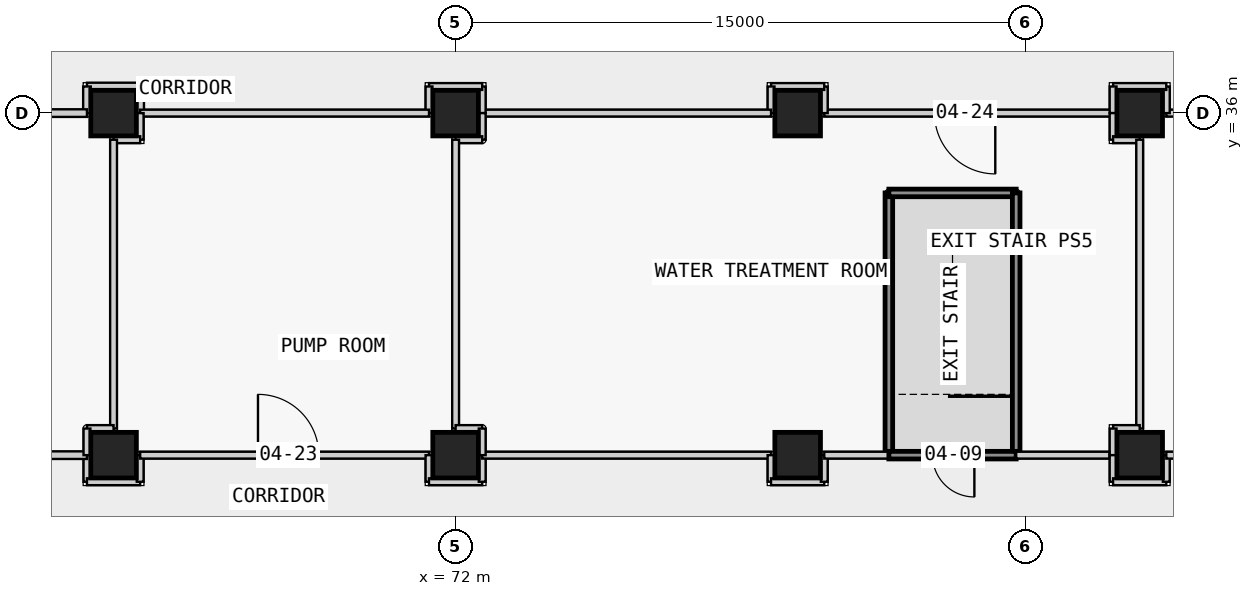
"""IFC4 building model, lengths in metres.
Left out: names, types, materials, properties, quantities, classifications, styles, units other than length and angle.
Written with IfcOpenShell. Run it as: python <this file> out.ifc"""

import sys

from ifc_helpers import new_model, si_unit, direction, frame, frame_2d, origin, origin_2d, place, context, subcontext, project, spatial, rectangle, extrude, element, fill, save


model = new_model("IFC4")
c1 = context("Model", 3, precision=1e-05, world=origin(), true_north=direction((0.0, 1.0)))
c2 = subcontext(c1, "Body", "Model", "MODEL_VIEW")
j1 = project(units=[si_unit("LENGTHUNIT", "METRE"), si_unit("PLANEANGLEUNIT", "RADIAN")], contexts=[c1])
p1 = place(None, origin())
s1 = spatial("IfcSite", under=j1, at=p1, CompositionType="ELEMENT")
p2 = place(p1, origin())
s2 = spatial("IfcBuilding", under=s1, at=p2, CompositionType="ELEMENT")
p3 = place(p2, frame((0.0, 0.0, 21.8)))
s3 = spatial("IfcBuildingStorey", under=s2, at=p3, CompositionType="ELEMENT", Elevation=21.8)
for number, where, z_axis, x_axis in (
    (1, (63.0, 27.0, 0.0), (0.0, 0.0, 1.0), (1.0, 0.0, 0.0)),
    (2, (63.0, 36.0, 0.0), (0.0, 0.0, 1.0), (1.0, 0.0, 0.0)),
    (3, (72.0, 27.0, 0.0), (0.0, 0.0, 1.0), (1.0, 0.0, 0.0)),
    (4, (72.0, 36.0, 0.0), (0.0, 0.0, 1.0), (1.0, 0.0, 0.0)),
    (5, (81.0, 27.0, 0.0), (0.0, 0.0, 1.0), (1.0, 0.0, 0.0)),
    (6, (81.0, 36.0, 0.0), (0.0, 0.0, 1.0), (1.0, 0.0, 0.0)),
    (7, (90.0, 27.0, 0.0), (0.0, 0.0, 1.0), (1.0, 0.0, 0.0)),
    (8, (90.0, 36.0, 0.0), (0.0, 0.0, 1.0), (1.0, 0.0, 0.0)),
):
    element("IfcColumn", number, at=place(p3, frame(where, z_axis=z_axis, x_axis=x_axis)), inside=s3, PredefinedType="COLUMN", context=c2, shape_type="SweptSolid", body=[
        extrude(rectangle(XDim=1.2, YDim=1.2, at=origin_2d()), origin(), (0.0, 0.0, 1.0), 5.0),
    ])
p4 = place(p3, frame((89.3, 36.0, 0.0), z_axis=(0.0, 0.0, 1.0), x_axis=(-1.0, 0.0, 0.0)))
e9 = element("IfcWall", 9, at=p4, inside=s3, PredefinedType="PARTITIONING", context=c2, shape_type="SweptSolid", body=[
    extrude(rectangle(XDim=7.6, YDim=0.18, at=frame_2d((3.8, 0.0))), origin(), (0.0, 0.0, 1.0), 4.5),
])
p5 = place(p4, frame((3.1, 0.0, 0.0)))
e10 = element("IfcOpeningElement", 10, at=p5, cuts=e9, PredefinedType="OPENING", context=c2, shape_type="SweptSolid", body=[
    extrude(rectangle(XDim=1.6, YDim=2.4, at=frame_2d((0.8, 1.2))), frame((0.0, 0.1, 0.0), z_axis=(0.0, -1.0, 0.0), x_axis=(1.0, 0.0, 0.0)), (0.0, 0.0, 1.0), 0.2),
])
p6 = place(p3, frame((81.7, 36.0, 0.0), z_axis=(0.0, 0.0, 1.0), x_axis=(0.0, 1.0, 0.0)))
e11 = element("IfcWall", 11, at=p6, inside=s3, PredefinedType="PARTITIONING", context=c2, shape_type="SweptSolid", body=[
    extrude(rectangle(XDim=0.7, YDim=0.18, at=frame_2d((0.35, 0.0))), origin(), (0.0, 0.0, 1.0), 4.5),
])
p7 = place(p3, frame((81.7, 36.7, 0.0), z_axis=(0.0, 0.0, 1.0), x_axis=(-1.0, 0.0, 0.0)))
e12 = element("IfcWall", 12, at=p7, inside=s3, PredefinedType="PARTITIONING", context=c2, shape_type="SweptSolid", body=[
    extrude(rectangle(XDim=1.4, YDim=0.18, at=frame_2d((0.7, 0.0))), origin(), (0.0, 0.0, 1.0), 4.5),
])
p8 = place(p3, frame((80.3, 36.7, 0.0), z_axis=(0.0, 0.0, 1.0), x_axis=(0.0, -1.0, 0.0)))
e13 = element("IfcWall", 13, at=p8, inside=s3, PredefinedType="PARTITIONING", context=c2, shape_type="SweptSolid", body=[
    extrude(rectangle(XDim=0.7, YDim=0.18, at=frame_2d((0.35, 0.0))), origin(), (0.0, 0.0, 1.0), 4.5),
])
p9 = place(p3, frame((80.3, 36.0, 0.0), z_axis=(0.0, 0.0, 1.0), x_axis=(-1.0, 0.0, 0.0)))
e14 = element("IfcWall", 14, at=p9, inside=s3, PredefinedType="PARTITIONING", context=c2, shape_type="SweptSolid", body=[
    extrude(rectangle(XDim=7.6, YDim=0.18, at=frame_2d((3.8, 0.0))), origin(), (0.0, 0.0, 1.0), 4.5),
])
p10 = place(p3, frame((83.4, 27.0, 0.0), z_axis=(0.0, 0.0, 1.0), x_axis=(0.0, 1.0, 0.0)))
e15 = element("IfcWall", 15, at=p10, inside=s3, PredefinedType="PARTITIONING", context=c2, shape_type="SweptSolid", body=[
    extrude(rectangle(XDim=6.9, YDim=0.2, at=frame_2d((3.45, 0.0))), origin(), (0.0, 0.0, 1.0), 4.5),
])
p11 = place(p3, frame((83.4, 33.9, 0.0), z_axis=(0.0, 0.0, 1.0), x_axis=(1.0, 0.0, 0.0)))
e16 = element("IfcWall", 16, at=p11, inside=s3, PredefinedType="PARTITIONING", context=c2, shape_type="SweptSolid", body=[
    extrude(rectangle(XDim=3.35, YDim=0.2, at=frame_2d((1.675, 0.0))), origin(), (0.0, 0.0, 1.0), 4.5),
])
p12 = place(p3, frame((86.75, 33.9, 0.0), z_axis=(0.0, 0.0, 1.0), x_axis=(0.0, -1.0, 0.0)))
e17 = element("IfcWall", 17, at=p12, inside=s3, PredefinedType="PARTITIONING", context=c2, shape_type="SweptSolid", body=[
    extrude(rectangle(XDim=6.9, YDim=0.2, at=frame_2d((3.45, 0.0))), origin(), (0.0, 0.0, 1.0), 4.5),
])
p13 = place(p3, frame((63.7, 36.0, 0.0), z_axis=(0.0, 0.0, 1.0), x_axis=(0.0, 1.0, 0.0)))
e18 = element("IfcWall", 18, at=p13, inside=s3, PredefinedType="PARTITIONING", context=c2, shape_type="SweptSolid", body=[
    extrude(rectangle(XDim=0.7, YDim=0.2, at=frame_2d((0.35, 0.0))), origin(), (0.0, 0.0, 1.0), 4.5),
])
p14 = place(p3, frame((63.7, 36.7, 0.0), z_axis=(0.0, 0.0, 1.0), x_axis=(-1.0, 0.0, 0.0)))
e19 = element("IfcWall", 19, at=p14, inside=s3, PredefinedType="PARTITIONING", context=c2, shape_type="SweptSolid", body=[
    extrude(rectangle(XDim=1.4, YDim=0.2, at=frame_2d((0.7, 0.0))), origin(), (0.0, 0.0, 1.0), 4.5),
])
p15 = place(p3, frame((62.3, 36.7, 0.0), z_axis=(0.0, 0.0, 1.0), x_axis=(0.0, -1.0, 0.0)))
e20 = element("IfcWall", 20, at=p15, inside=s3, PredefinedType="PARTITIONING", context=c2, shape_type="SweptSolid", body=[
    extrude(rectangle(XDim=0.7, YDim=0.2, at=frame_2d((0.35, 0.0))), origin(), (0.0, 0.0, 1.0), 4.5),
])
p16 = place(p3, frame((62.3, 36.0, 0.0), z_axis=(0.0, 0.0, 1.0), x_axis=(-1.0, 0.0, 0.0)))
e21 = element("IfcWall", 21, at=p16, inside=s3, PredefinedType="PARTITIONING", context=c2, shape_type="SweptSolid", body=[
    extrude(rectangle(XDim=7.6, YDim=0.2, at=frame_2d((3.8, 0.0))), origin(), (0.0, 0.0, 1.0), 4.5),
])
p17 = place(p16, frame((3.35, 0.0, 0.0)))
e22 = element("IfcOpeningElement", 22, at=p17, cuts=e21, PredefinedType="OPENING", context=c2, shape_type="SweptSolid", body=[
    extrude(rectangle(XDim=0.9, YDim=2.1, at=frame_2d((0.45, 1.05))), frame((0.0, 0.11, 0.0), z_axis=(0.0, -1.0, 0.0), x_axis=(1.0, 0.0, 0.0)), (0.0, 0.0, 1.0), 0.22),
])
p18 = place(p3, frame((62.3, 27.0, 0.0), z_axis=(0.0, 0.0, 1.0), x_axis=(0.0, -1.0, 0.0)))
e23 = element("IfcWall", 23, at=p18, inside=s3, PredefinedType="PARTITIONING", context=c2, shape_type="SweptSolid", body=[
    extrude(rectangle(XDim=0.7, YDim=0.18, at=frame_2d((0.35, 0.0))), origin(), (0.0, 0.0, 1.0), 4.5),
])
p19 = place(p3, frame((62.3, 26.3, 0.0), z_axis=(0.0, 0.0, 1.0), x_axis=(1.0, 0.0, 0.0)))
e24 = element("IfcWall", 24, at=p19, inside=s3, PredefinedType="PARTITIONING", context=c2, shape_type="SweptSolid", body=[
    extrude(rectangle(XDim=1.4, YDim=0.18, at=frame_2d((0.7, 0.0))), origin(), (0.0, 0.0, 1.0), 4.5),
])
p20 = place(p3, frame((63.7, 26.3, 0.0), z_axis=(0.0, 0.0, 1.0), x_axis=(0.0, 1.0, 0.0)))
e25 = element("IfcWall", 25, at=p20, inside=s3, PredefinedType="PARTITIONING", context=c2, shape_type="SweptSolid", body=[
    extrude(rectangle(XDim=0.7, YDim=0.18, at=frame_2d((0.35, 0.0))), origin(), (0.0, 0.0, 1.0), 4.5),
])
p21 = place(p3, frame((63.7, 27.0, 0.0), z_axis=(0.0, 0.0, 1.0), x_axis=(1.0, 0.0, 0.0)))
e26 = element("IfcWall", 26, at=p21, inside=s3, PredefinedType="PARTITIONING", context=c2, shape_type="SweptSolid", body=[
    extrude(rectangle(XDim=7.6, YDim=0.18, at=frame_2d((3.8, 0.0))), origin(), (0.0, 0.0, 1.0), 4.5),
])
p22 = place(p21, frame((3.1, 0.0, 0.0)))
e27 = element("IfcOpeningElement", 27, at=p22, cuts=e26, PredefinedType="OPENING", context=c2, shape_type="SweptSolid", body=[
    extrude(rectangle(XDim=1.6, YDim=2.4, at=frame_2d((0.8, 1.2))), frame((0.0, 0.1, 0.0), z_axis=(0.0, -1.0, 0.0), x_axis=(1.0, 0.0, 0.0)), (0.0, 0.0, 1.0), 0.2),
])
p23 = place(p3, frame((71.3, 27.0, 0.0), z_axis=(0.0, 0.0, 1.0), x_axis=(0.0, -1.0, 0.0)))
e28 = element("IfcWall", 28, at=p23, inside=s3, PredefinedType="PARTITIONING", context=c2, shape_type="SweptSolid", body=[
    extrude(rectangle(XDim=0.7, YDim=0.18, at=frame_2d((0.35, 0.0))), origin(), (0.0, 0.0, 1.0), 4.5),
])
p24 = place(p3, frame((71.3, 26.3, 0.0), z_axis=(0.0, 0.0, 1.0), x_axis=(1.0, 0.0, 0.0)))
e29 = element("IfcWall", 29, at=p24, inside=s3, PredefinedType="PARTITIONING", context=c2, shape_type="SweptSolid", body=[
    extrude(rectangle(XDim=1.4, YDim=0.18, at=frame_2d((0.7, 0.0))), origin(), (0.0, 0.0, 1.0), 4.5),
])
p25 = place(p3, frame((72.7, 26.3, 0.0), z_axis=(0.0, 0.0, 1.0), x_axis=(0.0, 1.0, 0.0)))
e30 = element("IfcWall", 30, at=p25, inside=s3, PredefinedType="PARTITIONING", context=c2, shape_type="SweptSolid", body=[
    extrude(rectangle(XDim=0.7, YDim=0.18, at=frame_2d((0.35, 0.0))), origin(), (0.0, 0.0, 1.0), 4.5),
])
p26 = place(p3, frame((98.3, 36.0, 0.0), z_axis=(0.0, 0.0, 1.0), x_axis=(-1.0, 0.0, 0.0)))
e31 = element("IfcWall", 31, at=p26, inside=s3, PredefinedType="PARTITIONING", context=c2, shape_type="SweptSolid", body=[
    extrude(rectangle(XDim=7.6, YDim=0.18, at=frame_2d((3.8, 0.0))), origin(), (0.0, 0.0, 1.0), 4.5),
])
p27 = place(p26, frame((3.1, 0.0, 0.0)))
e32 = element("IfcOpeningElement", 32, at=p27, cuts=e31, PredefinedType="OPENING", context=c2, shape_type="SweptSolid", body=[
    extrude(rectangle(XDim=1.6, YDim=2.4, at=frame_2d((0.8, 1.2))), frame((0.0, 0.1, 0.0), z_axis=(0.0, -1.0, 0.0), x_axis=(1.0, 0.0, 0.0)), (0.0, 0.0, 1.0), 0.2),
])
p28 = place(p3, frame((90.7, 36.0, 0.0), z_axis=(0.0, 0.0, 1.0), x_axis=(0.0, 1.0, 0.0)))
e33 = element("IfcWall", 33, at=p28, inside=s3, PredefinedType="PARTITIONING", context=c2, shape_type="SweptSolid", body=[
    extrude(rectangle(XDim=0.7, YDim=0.18, at=frame_2d((0.35, 0.0))), origin(), (0.0, 0.0, 1.0), 4.5),
])
p29 = place(p3, frame((90.7, 36.7, 0.0), z_axis=(0.0, 0.0, 1.0), x_axis=(-1.0, 0.0, 0.0)))
e34 = element("IfcWall", 34, at=p29, inside=s3, PredefinedType="PARTITIONING", context=c2, shape_type="SweptSolid", body=[
    extrude(rectangle(XDim=1.4, YDim=0.18, at=frame_2d((0.7, 0.0))), origin(), (0.0, 0.0, 1.0), 4.5),
])
p30 = place(p3, frame((89.3, 36.7, 0.0), z_axis=(0.0, 0.0, 1.0), x_axis=(0.0, -1.0, 0.0)))
e35 = element("IfcWall", 35, at=p30, inside=s3, PredefinedType="PARTITIONING", context=c2, shape_type="SweptSolid", body=[
    extrude(rectangle(XDim=0.7, YDim=0.18, at=frame_2d((0.35, 0.0))), origin(), (0.0, 0.0, 1.0), 4.5),
])
p31 = place(p3, frame((72.7, 27.0, 0.0), z_axis=(0.0, 0.0, 1.0), x_axis=(1.0, 0.0, 0.0)))
e36 = element("IfcWall", 36, at=p31, inside=s3, PredefinedType="PARTITIONING", context=c2, shape_type="SweptSolid", body=[
    extrude(rectangle(XDim=7.6, YDim=0.18, at=frame_2d((3.8, 0.0))), origin(), (0.0, 0.0, 1.0), 4.5),
])
p32 = place(p3, frame((80.3, 27.0, 0.0), z_axis=(0.0, 0.0, 1.0), x_axis=(0.0, -1.0, 0.0)))
e37 = element("IfcWall", 37, at=p32, inside=s3, PredefinedType="PARTITIONING", context=c2, shape_type="SweptSolid", body=[
    extrude(rectangle(XDim=0.7, YDim=0.18, at=frame_2d((0.35, 0.0))), origin(), (0.0, 0.0, 1.0), 4.5),
])
p33 = place(p3, frame((80.3, 26.3, 0.0), z_axis=(0.0, 0.0, 1.0), x_axis=(1.0, 0.0, 0.0)))
e38 = element("IfcWall", 38, at=p33, inside=s3, PredefinedType="PARTITIONING", context=c2, shape_type="SweptSolid", body=[
    extrude(rectangle(XDim=1.4, YDim=0.18, at=frame_2d((0.7, 0.0))), origin(), (0.0, 0.0, 1.0), 4.5),
])
p34 = place(p3, frame((81.7, 26.3, 0.0), z_axis=(0.0, 0.0, 1.0), x_axis=(0.0, 1.0, 0.0)))
e39 = element("IfcWall", 39, at=p34, inside=s3, PredefinedType="PARTITIONING", context=c2, shape_type="SweptSolid", body=[
    extrude(rectangle(XDim=0.7, YDim=0.18, at=frame_2d((0.35, 0.0))), origin(), (0.0, 0.0, 1.0), 4.5),
])
p35 = place(p3, frame((81.7, 27.0, 0.0), z_axis=(0.0, 0.0, 1.0), x_axis=(1.0, 0.0, 0.0)))
e40 = element("IfcWall", 40, at=p35, inside=s3, PredefinedType="PARTITIONING", context=c2, shape_type="SweptSolid", body=[
    extrude(rectangle(XDim=1.7, YDim=0.18, at=frame_2d((0.85, 0.0))), origin(), (0.0, 0.0, 1.0), 4.5),
])
p36 = place(p3, frame((72.7, 36.0, 0.0), z_axis=(0.0, 0.0, 1.0), x_axis=(0.0, 1.0, 0.0)))
e41 = element("IfcWall", 41, at=p36, inside=s3, PredefinedType="PARTITIONING", context=c2, shape_type="SweptSolid", body=[
    extrude(rectangle(XDim=0.7, YDim=0.18, at=frame_2d((0.35, 0.0))), origin(), (0.0, 0.0, 1.0), 4.5),
])
p37 = place(p3, frame((72.7, 36.7, 0.0), z_axis=(0.0, 0.0, 1.0), x_axis=(-1.0, 0.0, 0.0)))
e42 = element("IfcWall", 42, at=p37, inside=s3, PredefinedType="PARTITIONING", context=c2, shape_type="SweptSolid", body=[
    extrude(rectangle(XDim=1.4, YDim=0.18, at=frame_2d((0.7, 0.0))), origin(), (0.0, 0.0, 1.0), 4.5),
])
p38 = place(p3, frame((71.3, 36.7, 0.0), z_axis=(0.0, 0.0, 1.0), x_axis=(0.0, -1.0, 0.0)))
e43 = element("IfcWall", 43, at=p38, inside=s3, PredefinedType="PARTITIONING", context=c2, shape_type="SweptSolid", body=[
    extrude(rectangle(XDim=0.7, YDim=0.18, at=frame_2d((0.35, 0.0))), origin(), (0.0, 0.0, 1.0), 4.5),
])
p39 = place(p3, frame((71.3, 36.0, 0.0), z_axis=(0.0, 0.0, 1.0), x_axis=(-1.0, 0.0, 0.0)))
e44 = element("IfcWall", 44, at=p39, inside=s3, PredefinedType="PARTITIONING", context=c2, shape_type="SweptSolid", body=[
    extrude(rectangle(XDim=7.6, YDim=0.18, at=frame_2d((3.8, 0.0))), origin(), (0.0, 0.0, 1.0), 4.5),
])
for number, where, z_axis, x_axis in (
    (45, (89.3, 36.0, 0.0), (0.0, 0.0, 1.0), (0.0, -1.0, 0.0)),
    (46, (89.3, 35.3, 0.0), (0.0, 0.0, 1.0), (1.0, 0.0, 0.0)),
):
    element("IfcWall", number, at=place(p3, frame(where, z_axis=z_axis, x_axis=x_axis)), inside=s3, PredefinedType="PARTITIONING", context=c2, shape_type="SweptSolid", body=[
        extrude(rectangle(XDim=0.7, YDim=0.18, at=frame_2d((0.35, 0.0))), origin(), (0.0, 0.0, 1.0), 4.5),
    ])
p40 = place(p3, frame((90.0, 35.3, 0.0), z_axis=(0.0, 0.0, 1.0), x_axis=(0.0, -1.0, 0.0)))
e47 = element("IfcWall", 47, at=p40, inside=s3, PredefinedType="PARTITIONING", context=c2, shape_type="SweptSolid", body=[
    extrude(rectangle(XDim=7.6, YDim=0.18, at=frame_2d((3.8, 0.0))), origin(), (0.0, 0.0, 1.0), 4.5),
])
for number, where, z_axis, x_axis in (
    (48, (90.0, 27.7, 0.0), (0.0, 0.0, 1.0), (-1.0, 0.0, 0.0)),
    (49, (89.3, 27.7, 0.0), (0.0, 0.0, 1.0), (0.0, -1.0, 0.0)),
    (50, (89.3, 27.0, 0.0), (0.0, 0.0, 1.0), (0.0, -1.0, 0.0)),
):
    element("IfcWall", number, at=place(p3, frame(where, z_axis=z_axis, x_axis=x_axis)), inside=s3, PredefinedType="PARTITIONING", context=c2, shape_type="SweptSolid", body=[
        extrude(rectangle(XDim=0.7, YDim=0.18, at=frame_2d((0.35, 0.0))), origin(), (0.0, 0.0, 1.0), 4.5),
    ])
p41 = place(p3, frame((89.3, 26.3, 0.0), z_axis=(0.0, 0.0, 1.0), x_axis=(1.0, 0.0, 0.0)))
e51 = element("IfcWall", 51, at=p41, inside=s3, PredefinedType="PARTITIONING", context=c2, shape_type="SweptSolid", body=[
    extrude(rectangle(XDim=1.4, YDim=0.18, at=frame_2d((0.7, 0.0))), origin(), (0.0, 0.0, 1.0), 4.5),
])
p42 = place(p3, frame((90.7, 26.3, 0.0), z_axis=(0.0, 0.0, 1.0), x_axis=(0.0, 1.0, 0.0)))
e52 = element("IfcWall", 52, at=p42, inside=s3, PredefinedType="PARTITIONING", context=c2, shape_type="SweptSolid", body=[
    extrude(rectangle(XDim=0.7, YDim=0.18, at=frame_2d((0.35, 0.0))), origin(), (0.0, 0.0, 1.0), 4.5),
])
p43 = place(p3, frame((90.7, 27.0, 0.0), z_axis=(0.0, 0.0, 1.0), x_axis=(1.0, 0.0, 0.0)))
e53 = element("IfcWall", 53, at=p43, inside=s3, PredefinedType="PARTITIONING", context=c2, shape_type="SweptSolid", body=[
    extrude(rectangle(XDim=7.6, YDim=0.18, at=frame_2d((3.8, 0.0))), origin(), (0.0, 0.0, 1.0), 4.5),
])
p44 = place(p3, frame((54.7, 27.0, 0.0), z_axis=(0.0, 0.0, 1.0), x_axis=(1.0, 0.0, 0.0)))
e54 = element("IfcWall", 54, at=p44, inside=s3, PredefinedType="PARTITIONING", context=c2, shape_type="SweptSolid", body=[
    extrude(rectangle(XDim=7.6, YDim=0.2, at=frame_2d((3.8, 0.0))), origin(), (0.0, 0.0, 1.0), 4.5),
])
for number, where, z_axis, x_axis in (
    (55, (63.7, 36.0, 0.0), (0.0, 0.0, 1.0), (0.0, -1.0, 0.0)),
    (56, (63.7, 35.3, 0.0), (0.0, 0.0, 1.0), (-1.0, 0.0, 0.0)),
):
    element("IfcWall", number, at=place(p3, frame(where, z_axis=z_axis, x_axis=x_axis)), inside=s3, PredefinedType="PARTITIONING", context=c2, shape_type="SweptSolid", body=[
        extrude(rectangle(XDim=0.7, YDim=0.18, at=frame_2d((0.35, 0.0))), origin(), (0.0, 0.0, 1.0), 4.5),
    ])
p45 = place(p3, frame((63.0, 35.3, 0.0), z_axis=(0.0, 0.0, 1.0), x_axis=(0.0, -1.0, 0.0)))
e57 = element("IfcWall", 57, at=p45, inside=s3, PredefinedType="PARTITIONING", context=c2, shape_type="SweptSolid", body=[
    extrude(rectangle(XDim=7.6, YDim=0.18, at=frame_2d((3.8, 0.0))), origin(), (0.0, 0.0, 1.0), 4.5),
])
for number, where, z_axis, x_axis in (
    (58, (63.0, 27.7, 0.0), (0.0, 0.0, 1.0), (-1.0, 0.0, 0.0)),
    (59, (62.3, 27.7, 0.0), (0.0, 0.0, 1.0), (0.0, -1.0, 0.0)),
    (60, (72.7, 36.0, 0.0), (0.0, 0.0, 1.0), (0.0, -1.0, 0.0)),
    (61, (72.7, 35.3, 0.0), (0.0, 0.0, 1.0), (-1.0, 0.0, 0.0)),
):
    element("IfcWall", number, at=place(p3, frame(where, z_axis=z_axis, x_axis=x_axis)), inside=s3, PredefinedType="PARTITIONING", context=c2, shape_type="SweptSolid", body=[
        extrude(rectangle(XDim=0.7, YDim=0.18, at=frame_2d((0.35, 0.0))), origin(), (0.0, 0.0, 1.0), 4.5),
    ])
p46 = place(p3, frame((72.0, 35.3, 0.0), z_axis=(0.0, 0.0, 1.0), x_axis=(0.0, -1.0, 0.0)))
e62 = element("IfcWall", 62, at=p46, inside=s3, PredefinedType="PARTITIONING", context=c2, shape_type="SweptSolid", body=[
    extrude(rectangle(XDim=7.6, YDim=0.18, at=frame_2d((3.8, 0.0))), origin(), (0.0, 0.0, 1.0), 4.5),
])
for number, where, z_axis, x_axis in (
    (63, (72.0, 27.7, 0.0), (0.0, 0.0, 1.0), (1.0, 0.0, 0.0)),
    (64, (72.7, 27.7, 0.0), (0.0, 0.0, 1.0), (0.0, -1.0, 0.0)),
):
    element("IfcWall", number, at=place(p3, frame(where, z_axis=z_axis, x_axis=x_axis)), inside=s3, PredefinedType="PARTITIONING", context=c2, shape_type="SweptSolid", body=[
        extrude(rectangle(XDim=0.7, YDim=0.18, at=frame_2d((0.35, 0.0))), origin(), (0.0, 0.0, 1.0), 4.5),
    ])
p47 = place(p3, frame((86.75, 27.0, 0.0), z_axis=(0.0, 0.0, 1.0), x_axis=(-1.0, 0.0, 0.0)))
e65 = element("IfcWall", 65, at=p47, inside=s3, PredefinedType="PARTITIONING", context=c2, shape_type="SweptSolid", body=[
    extrude(rectangle(XDim=3.35, YDim=0.2, at=frame_2d((1.675, 0.0))), origin(), (0.0, 0.0, 1.0), 4.5),
])
p48 = place(p47, frame((1.1, 0.0, 0.0)))
e66 = element("IfcOpeningElement", 66, at=p48, cuts=e65, PredefinedType="OPENING", context=c2, shape_type="SweptSolid", body=[
    extrude(rectangle(XDim=1.1, YDim=2.1, at=frame_2d((0.55, 1.05))), frame((0.0, 0.11, 0.0), z_axis=(0.0, -1.0, 0.0), x_axis=(1.0, 0.0, 0.0)), (0.0, 0.0, 1.0), 0.22),
])
p49 = place(p3, frame((86.75, 27.0, 0.0), z_axis=(0.0, 0.0, 1.0), x_axis=(1.0, 0.0, 0.0)))
e67 = element("IfcWall", 67, at=p49, inside=s3, PredefinedType="PARTITIONING", context=c2, shape_type="SweptSolid", body=[
    extrude(rectangle(XDim=2.45, YDim=0.18, at=frame_2d((1.225, 0.0))), origin(), (0.0, 0.0, 1.0), 4.5),
])
p50 = place(p48, origin())
e68 = element("IfcDoor", 68, at=p50, inside=s3, OperationType="SINGLE_SWING_LEFT", PredefinedType="DOOR", context=c2, shape_type="SweptSolid", body=[
    extrude(rectangle(XDim=1.1, YDim=2.1, at=frame_2d((0.55, 1.05))), frame((0.0, 0.025, 0.0), z_axis=(0.0, -1.0, 0.0), x_axis=(1.0, 0.0, 0.0)), (0.0, 0.0, 1.0), 0.05),
])
fill(e66, e68)
p51 = place(p22, origin())
e69 = element("IfcDoor", 69, at=p51, inside=s3, OperationType="SINGLE_SWING_LEFT", PredefinedType="DOOR", context=c2, shape_type="SweptSolid", body=[
    extrude(rectangle(XDim=1.6, YDim=2.4, at=frame_2d((0.8, 1.2))), frame((0.0, 0.025, 0.0), z_axis=(0.0, -1.0, 0.0), x_axis=(1.0, 0.0, 0.0)), (0.0, 0.0, 1.0), 0.05),
])
fill(e27, e69)
p52 = place(p5, origin())
e70 = element("IfcDoor", 70, at=p52, inside=s3, OperationType="SINGLE_SWING_LEFT", PredefinedType="DOOR", context=c2, shape_type="SweptSolid", body=[
    extrude(rectangle(XDim=1.6, YDim=2.4, at=frame_2d((0.8, 1.2))), frame((0.0, 0.025, 0.0), z_axis=(0.0, -1.0, 0.0), x_axis=(1.0, 0.0, 0.0)), (0.0, 0.0, 1.0), 0.05),
])
fill(e10, e70)
save(model, sys.argv[1])
